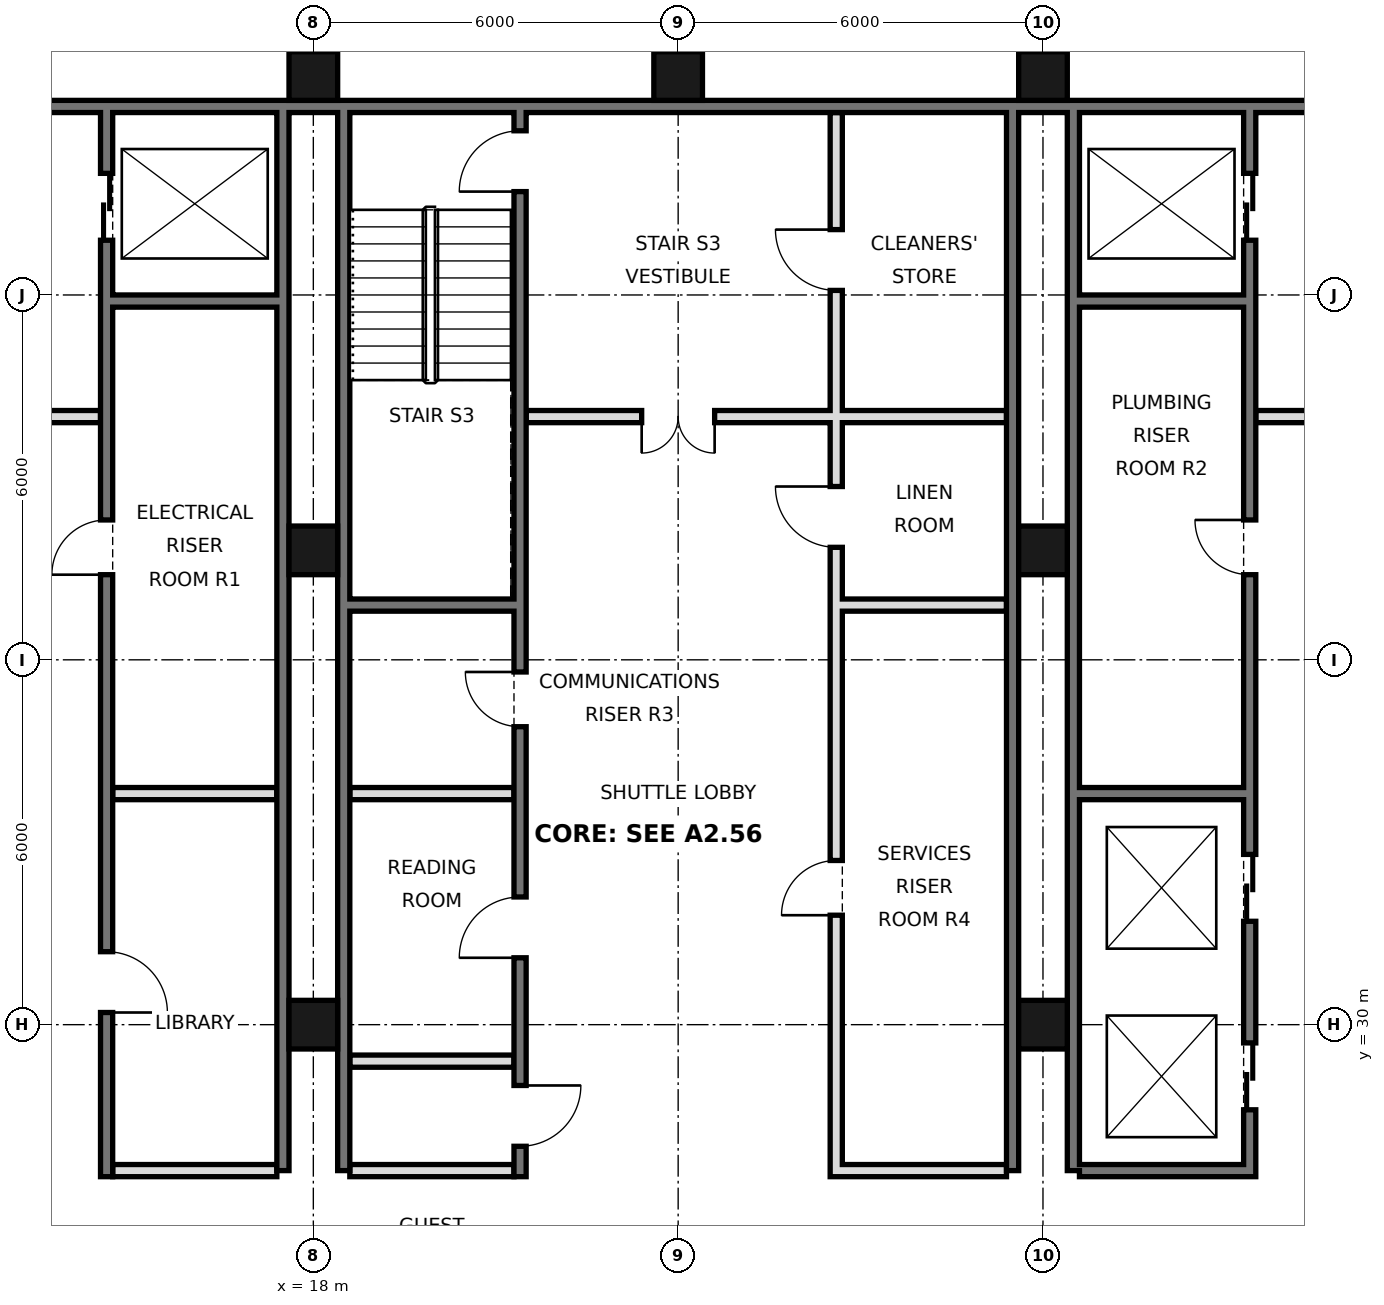
"""IFC4 building model, lengths in metres.
Left out: names, types, materials, properties, quantities, classifications, styles, units other than length and angle.
Written with IfcOpenShell. Run it as: python <this file> out.ifc"""

import sys

from ifc_helpers import new_model, si_unit, direction, frame, frame_2d, origin, origin_2d, place, context, subcontext, project, spatial, rectangle, hollow_rectangle, extrude, element, fill, save


model = new_model("IFC4")
c1 = context("Model", 3, precision=1e-05, world=origin(), true_north=direction((0.0, 1.0)))
c2 = subcontext(c1, "Body", "Model", "MODEL_VIEW")
j1 = project(units=[si_unit("LENGTHUNIT", "METRE"), si_unit("PLANEANGLEUNIT", "RADIAN")], contexts=[c1])
p1 = place(None, origin())
s1 = spatial("IfcSite", under=j1, at=p1, CompositionType="ELEMENT")
p2 = place(p1, origin())
s2 = spatial("IfcBuilding", under=s1, at=p2, CompositionType="ELEMENT")
p3 = place(p2, frame((0.0, 0.0, 222.6)))
s3 = spatial("IfcBuildingStorey", under=s2, at=p3, CompositionType="ELEMENT", Elevation=222.6)
for number, where, z_axis, x_axis in (
    (1, (18.0, 30.0, 0.0), (0.0, 0.0, 1.0), (1.0, 0.0, 0.0)),
    (2, (18.0, 37.8, 0.0), (0.0, 0.0, 1.0), (1.0, 0.0, 0.0)),
    (3, (18.0, 45.6, 0.0), (0.0, 0.0, 1.0), (1.0, 0.0, 0.0)),
    (4, (24.0, 45.6, 0.0), (0.0, 0.0, 1.0), (1.0, 0.0, 0.0)),
    (5, (30.0, 30.0, 0.0), (0.0, 0.0, 1.0), (1.0, 0.0, 0.0)),
    (6, (30.0, 37.8, 0.0), (0.0, 0.0, 1.0), (1.0, 0.0, 0.0)),
    (7, (30.0, 45.6, 0.0), (0.0, 0.0, 1.0), (1.0, 0.0, 0.0)),
):
    element("IfcColumn", number, at=place(p3, frame(where, z_axis=z_axis, x_axis=x_axis)), inside=s3, PredefinedType="COLUMN", context=c2, shape_type="SweptSolid", body=[
        extrude(hollow_rectangle(XDim=0.8, YDim=0.8, WallThickness=0.04, at=origin_2d()), origin(), (0.0, 0.0, 1.0), 3.6),
    ])
p4 = place(p3, frame((6.6, 45.1, 0.0), z_axis=(0.0, 0.0, 1.0), x_axis=(1.0, 0.0, 0.0)))
e8 = element("IfcWall", 8, at=p4, inside=s3, PredefinedType="SOLIDWALL", context=c2, shape_type="SweptSolid", body=[
    extrude(rectangle(XDim=34.8, YDim=0.2, at=frame_2d((17.4, 0.0))), origin(), (0.0, 0.0, 1.0), 3.42),
])
for number, where, z_axis, x_axis in (
    (9, (17.5, 27.6, 0.0), (0.0, 0.0, 1.0), (0.0, 1.0, 0.0)),
    (10, (18.5, 27.6, 0.0), (0.0, 0.0, 1.0), (0.0, 1.0, 0.0)),
    (11, (29.5, 27.6, 0.0), (0.0, 0.0, 1.0), (0.0, 1.0, 0.0)),
    (12, (30.5, 27.6, 0.0), (0.0, 0.0, 1.0), (0.0, 1.0, 0.0)),
):
    element("IfcWall", number, at=place(p3, frame(where, z_axis=z_axis, x_axis=x_axis)), inside=s3, PredefinedType="SOLIDWALL", context=c2, shape_type="SweptSolid", body=[
        extrude(rectangle(XDim=17.5, YDim=0.2, at=frame_2d((8.75, 0.0))), origin(), (0.0, 0.0, 1.0), 3.42),
    ])
p5 = place(p3, frame((14.6, 27.5, 0.0), z_axis=(0.0, 0.0, 1.0), x_axis=(0.0, 1.0, 0.0)))
e13 = element("IfcWall", 13, at=p5, inside=s3, PredefinedType="SOLIDWALL", context=c2, shape_type="SweptSolid", body=[
    extrude(rectangle(XDim=17.5, YDim=0.2, at=frame_2d((8.75, 0.0))), origin(), (0.0, 0.0, 1.0), 3.42),
])
p6 = place(p5, frame((15.4, 0.0, 0.0)))
e14 = element("IfcOpeningElement", 14, at=p6, cuts=e13, PredefinedType="OPENING", context=c2, shape_type="SweptSolid", body=[
    extrude(rectangle(XDim=1.1, YDim=2.1, at=frame_2d((0.55, 1.05))), frame((0.0, 0.11, 0.0), z_axis=(0.0, -1.0, 0.0), x_axis=(1.0, 0.0, 0.0)), (0.0, 0.0, 1.0), 0.22),
])
p7 = place(p5, frame((2.7, 0.0, 0.0)))
e15 = element("IfcOpeningElement", 15, at=p7, cuts=e13, PredefinedType="OPENING", context=c2, shape_type="SweptSolid", body=[
    extrude(rectangle(XDim=1.0, YDim=2.1, at=frame_2d((0.5, 1.05))), frame((0.0, 0.11, 0.0), z_axis=(0.0, -1.0, 0.0), x_axis=(1.0, 0.0, 0.0)), (0.0, 0.0, 1.0), 0.22),
])
p8 = place(p5, frame((9.9, 0.0, 0.0)))
e16 = element("IfcOpeningElement", 16, at=p8, cuts=e13, PredefinedType="OPENING", context=c2, shape_type="SweptSolid", body=[
    extrude(rectangle(XDim=0.9, YDim=2.1, at=frame_2d((0.45, 1.05))), frame((0.0, 0.11, 0.0), z_axis=(0.0, -1.0, 0.0), x_axis=(1.0, 0.0, 0.0)), (0.0, 0.0, 1.0), 0.22),
])
p9 = place(p3, frame((21.4, 27.5, 0.0), z_axis=(0.0, 0.0, 1.0), x_axis=(0.0, 1.0, 0.0)))
e17 = element("IfcWall", 17, at=p9, inside=s3, PredefinedType="SOLIDWALL", context=c2, shape_type="SweptSolid", body=[
    extrude(rectangle(XDim=17.5, YDim=0.2, at=frame_2d((8.75, 0.0))), origin(), (0.0, 0.0, 1.0), 3.42),
])
p10 = place(p9, frame((0.5, 0.0, 0.0)))
e18 = element("IfcOpeningElement", 18, at=p10, cuts=e17, PredefinedType="OPENING", context=c2, shape_type="SweptSolid", body=[
    extrude(rectangle(XDim=1.0, YDim=2.1, at=frame_2d((0.5, 1.05))), frame((0.0, 0.11, 0.0), z_axis=(0.0, -1.0, 0.0), x_axis=(1.0, 0.0, 0.0)), (0.0, 0.0, 1.0), 0.22),
])
p11 = place(p9, frame((3.6, 0.0, 0.0)))
e19 = element("IfcOpeningElement", 19, at=p11, cuts=e17, PredefinedType="OPENING", context=c2, shape_type="SweptSolid", body=[
    extrude(rectangle(XDim=1.0, YDim=2.1, at=frame_2d((0.5, 1.05))), frame((0.0, 0.11, 0.0), z_axis=(0.0, -1.0, 0.0), x_axis=(1.0, 0.0, 0.0)), (0.0, 0.0, 1.0), 0.22),
])
p12 = place(p9, frame((16.2, 0.0, 0.0)))
e20 = element("IfcOpeningElement", 20, at=p12, cuts=e17, PredefinedType="OPENING", context=c2, shape_type="SweptSolid", body=[
    extrude(rectangle(XDim=1.0, YDim=2.1, at=frame_2d((0.5, 1.05))), frame((0.0, 0.11, 0.0), z_axis=(0.0, -1.0, 0.0), x_axis=(1.0, 0.0, 0.0)), (0.0, 0.0, 1.0), 0.22),
])
p13 = place(p9, frame((7.4, 0.0, 0.0)))
e21 = element("IfcOpeningElement", 21, at=p13, cuts=e17, PredefinedType="OPENING", context=c2, shape_type="SweptSolid", body=[
    extrude(rectangle(XDim=0.9, YDim=2.1, at=frame_2d((0.45, 1.05))), frame((0.0, 0.11, 0.0), z_axis=(0.0, -1.0, 0.0), x_axis=(1.0, 0.0, 0.0)), (0.0, 0.0, 1.0), 0.22),
])
p14 = place(p3, frame((26.6, 27.5, 0.0), z_axis=(0.0, 0.0, 1.0), x_axis=(0.0, 1.0, 0.0)))
e22 = element("IfcWall", 22, at=p14, inside=s3, PredefinedType="SOLIDWALL", context=c2, shape_type="SweptSolid", body=[
    extrude(rectangle(XDim=17.5, YDim=0.2, at=frame_2d((8.75, 0.0))), origin(), (0.0, 0.0, 1.0), 3.42),
])
p15 = place(p14, frame((4.3, 0.0, 0.0)))
e23 = element("IfcOpeningElement", 23, at=p15, cuts=e22, PredefinedType="OPENING", context=c2, shape_type="SweptSolid", body=[
    extrude(rectangle(XDim=0.9, YDim=2.1, at=frame_2d((0.45, 1.05))), frame((0.0, 0.11, 0.0), z_axis=(0.0, -1.0, 0.0), x_axis=(1.0, 0.0, 0.0)), (0.0, 0.0, 1.0), 0.22),
])
p16 = place(p14, frame((10.35, 0.0, 0.0)))
e24 = element("IfcOpeningElement", 24, at=p16, cuts=e22, PredefinedType="OPENING", context=c2, shape_type="SweptSolid", body=[
    extrude(rectangle(XDim=1.0, YDim=2.1, at=frame_2d((0.5, 1.05))), frame((0.0, 0.11, 0.0), z_axis=(0.0, -1.0, 0.0), x_axis=(1.0, 0.0, 0.0)), (0.0, 0.0, 1.0), 0.22),
])
p17 = place(p14, frame((14.575, 0.0, 0.0)))
e25 = element("IfcOpeningElement", 25, at=p17, cuts=e22, PredefinedType="OPENING", context=c2, shape_type="SweptSolid", body=[
    extrude(rectangle(XDim=1.0, YDim=2.1, at=frame_2d((0.5, 1.05))), frame((0.0, 0.11, 0.0), z_axis=(0.0, -1.0, 0.0), x_axis=(1.0, 0.0, 0.0)), (0.0, 0.0, 1.0), 0.22),
])
p18 = place(p3, frame((33.4, 27.5, 0.0), z_axis=(0.0, 0.0, 1.0), x_axis=(0.0, 1.0, 0.0)))
e26 = element("IfcWall", 26, at=p18, inside=s3, PredefinedType="SOLIDWALL", context=c2, shape_type="SweptSolid", body=[
    extrude(rectangle(XDim=17.5, YDim=0.2, at=frame_2d((8.75, 0.0))), origin(), (0.0, 0.0, 1.0), 3.42),
])
p19 = place(p18, frame((1.1, 0.0, 0.0)))
e27 = element("IfcOpeningElement", 27, at=p19, cuts=e26, PredefinedType="OPENING", context=c2, shape_type="SweptSolid", body=[
    extrude(rectangle(XDim=1.1, YDim=2.1, at=frame_2d((0.55, 1.05))), frame((0.0, 0.11, 0.0), z_axis=(0.0, -1.0, 0.0), x_axis=(1.0, 0.0, 0.0)), (0.0, 0.0, 1.0), 0.22),
])
p20 = place(p18, frame((4.2, 0.0, 0.0)))
e28 = element("IfcOpeningElement", 28, at=p20, cuts=e26, PredefinedType="OPENING", context=c2, shape_type="SweptSolid", body=[
    extrude(rectangle(XDim=1.1, YDim=2.1, at=frame_2d((0.55, 1.05))), frame((0.0, 0.11, 0.0), z_axis=(0.0, -1.0, 0.0), x_axis=(1.0, 0.0, 0.0)), (0.0, 0.0, 1.0), 0.22),
])
p21 = place(p18, frame((15.4, 0.0, 0.0)))
e29 = element("IfcOpeningElement", 29, at=p21, cuts=e26, PredefinedType="OPENING", context=c2, shape_type="SweptSolid", body=[
    extrude(rectangle(XDim=1.1, YDim=2.1, at=frame_2d((0.55, 1.05))), frame((0.0, 0.11, 0.0), z_axis=(0.0, -1.0, 0.0), x_axis=(1.0, 0.0, 0.0)), (0.0, 0.0, 1.0), 0.22),
])
p22 = place(p18, frame((9.9, 0.0, 0.0)))
e30 = element("IfcOpeningElement", 30, at=p22, cuts=e26, PredefinedType="OPENING", context=c2, shape_type="SweptSolid", body=[
    extrude(rectangle(XDim=0.9, YDim=2.1, at=frame_2d((0.45, 1.05))), frame((0.0, 0.11, 0.0), z_axis=(0.0, -1.0, 0.0), x_axis=(1.0, 0.0, 0.0)), (0.0, 0.0, 1.0), 0.22),
])
for number, where, z_axis, x_axis in (
    (31, (14.7, 27.6, 0.0), (0.0, 0.0, 1.0), (1.0, 0.0, 0.0)),
    (32, (18.6, 27.6, 0.0), (0.0, 0.0, 1.0), (1.0, 0.0, 0.0)),
):
    element("IfcWall", number, at=place(p3, frame(where, z_axis=z_axis, x_axis=x_axis)), inside=s3, PredefinedType="PARTITIONING", context=c2, shape_type="SweptSolid", body=[
        extrude(rectangle(XDim=2.7, YDim=0.2, at=frame_2d((1.35, 0.0))), origin(), (0.0, 0.0, 1.0), 3.42),
    ])
for number, where, z_axis, x_axis in (
    (33, (26.7, 27.6, 0.0), (0.0, 0.0, 1.0), (1.0, 0.0, 0.0)),
    (34, (30.6, 27.6, 0.0), (0.0, 0.0, 1.0), (1.0, 0.0, 0.0)),
):
    element("IfcWall", number, at=place(p3, frame(where, z_axis=z_axis, x_axis=x_axis)), inside=s3, PredefinedType="SOLIDWALL", context=c2, shape_type="SweptSolid", body=[
        extrude(rectangle(XDim=2.7, YDim=0.2, at=frame_2d((1.35, 0.0))), origin(), (0.0, 0.0, 1.0), 3.42),
    ])
p23 = place(p3, frame((18.6, 29.4, 0.0), z_axis=(0.0, 0.0, 1.0), x_axis=(1.0, 0.0, 0.0)))
e35 = element("IfcWall", 35, at=p23, inside=s3, PredefinedType="PARTITIONING", context=c2, shape_type="SweptSolid", body=[
    extrude(rectangle(XDim=2.7, YDim=0.2, at=frame_2d((1.35, 0.0))), origin(), (0.0, 0.0, 1.0), 3.42),
])
for number, where, z_axis, x_axis in (
    (36, (14.7, 33.8, 0.0), (0.0, 0.0, 1.0), (1.0, 0.0, 0.0)),
    (37, (18.6, 33.8, 0.0), (0.0, 0.0, 1.0), (1.0, 0.0, 0.0)),
    (38, (30.6, 33.8, 0.0), (0.0, 0.0, 1.0), (1.0, 0.0, 0.0)),
    (39, (18.6, 36.9, 0.0), (0.0, 0.0, 1.0), (1.0, 0.0, 0.0)),
    (40, (26.7, 36.9, 0.0), (0.0, 0.0, 1.0), (1.0, 0.0, 0.0)),
):
    element("IfcWall", number, at=place(p3, frame(where, z_axis=z_axis, x_axis=x_axis)), inside=s3, PredefinedType="SOLIDWALL", context=c2, shape_type="SweptSolid", body=[
        extrude(rectangle(XDim=2.7, YDim=0.2, at=frame_2d((1.35, 0.0))), origin(), (0.0, 0.0, 1.0), 3.42),
    ])
p24 = place(p3, frame((21.5, 40.0, 0.0), z_axis=(0.0, 0.0, 1.0), x_axis=(1.0, 0.0, 0.0)))
e41 = element("IfcWall", 41, at=p24, inside=s3, PredefinedType="PARTITIONING", context=c2, shape_type="SweptSolid", body=[
    extrude(rectangle(XDim=7.9, YDim=0.2, at=frame_2d((3.95, 0.0))), origin(), (0.0, 0.0, 1.0), 3.42),
])
p25 = place(p24, frame((1.9, 0.0, 0.0)))
e42 = element("IfcOpeningElement", 42, at=p25, cuts=e41, PredefinedType="OPENING", context=c2, shape_type="SweptSolid", body=[
    extrude(rectangle(XDim=1.2, YDim=2.1, at=frame_2d((0.6, 1.05))), frame((0.0, 0.11, 0.0), z_axis=(0.0, -1.0, 0.0), x_axis=(1.0, 0.0, 0.0)), (0.0, 0.0, 1.0), 0.22),
])
p26 = place(p3, frame((33.5, 40.0, 0.0), z_axis=(0.0, 0.0, 1.0), x_axis=(1.0, 0.0, 0.0)))
e43 = element("IfcWall", 43, at=p26, inside=s3, PredefinedType="PARTITIONING", context=c2, shape_type="SweptSolid", body=[
    extrude(rectangle(XDim=5.0, YDim=0.2, at=frame_2d((2.5, 0.0))), origin(), (0.0, 0.0, 1.0), 3.42),
])
p27 = place(p26, frame((1.9, 0.0, 0.0)))
e44 = element("IfcOpeningElement", 44, at=p27, cuts=e43, PredefinedType="OPENING", context=c2, shape_type="SweptSolid", body=[
    extrude(rectangle(XDim=1.2, YDim=2.1, at=frame_2d((0.6, 1.05))), frame((0.0, 0.11, 0.0), z_axis=(0.0, -1.0, 0.0), x_axis=(1.0, 0.0, 0.0)), (0.0, 0.0, 1.0), 0.22),
])
p28 = place(p3, frame((9.5, 40.0, 0.0), z_axis=(0.0, 0.0, 1.0), x_axis=(1.0, 0.0, 0.0)))
e45 = element("IfcWall", 45, at=p28, inside=s3, PredefinedType="PARTITIONING", context=c2, shape_type="SweptSolid", body=[
    extrude(rectangle(XDim=5.0, YDim=0.2, at=frame_2d((2.5, 0.0))), origin(), (0.0, 0.0, 1.0), 3.42),
])
p29 = place(p28, frame((1.9, 0.0, 0.0)))
e46 = element("IfcOpeningElement", 46, at=p29, cuts=e45, PredefinedType="OPENING", context=c2, shape_type="SweptSolid", body=[
    extrude(rectangle(XDim=1.2, YDim=2.1, at=frame_2d((0.6, 1.05))), frame((0.0, 0.11, 0.0), z_axis=(0.0, -1.0, 0.0), x_axis=(1.0, 0.0, 0.0)), (0.0, 0.0, 1.0), 0.22),
])
for number, where, z_axis, x_axis in (
    (47, (14.7, 41.9, 0.0), (0.0, 0.0, 1.0), (1.0, 0.0, 0.0)),
    (48, (30.6, 41.9, 0.0), (0.0, 0.0, 1.0), (1.0, 0.0, 0.0)),
):
    element("IfcWall", number, at=place(p3, frame(where, z_axis=z_axis, x_axis=x_axis)), inside=s3, PredefinedType="SOLIDWALL", context=c2, shape_type="SweptSolid", body=[
        extrude(rectangle(XDim=2.7, YDim=0.2, at=frame_2d((1.35, 0.0))), origin(), (0.0, 0.0, 1.0), 3.42),
    ])
p30 = place(p25, frame((1.2, 0.0, 0.0), z_axis=(0.0, 0.0, 1.0), x_axis=(-1.0, 0.0, 0.0)))
e49 = element("IfcDoor", 49, at=p30, inside=s3, OperationType="DOUBLE_DOOR_SINGLE_SWING", PredefinedType="DOOR", context=c2, shape_type="SweptSolid", body=[
    extrude(rectangle(XDim=1.2, YDim=2.1, at=frame_2d((0.6, 1.05))), frame((0.0, 0.025, 0.0), z_axis=(0.0, -1.0, 0.0), x_axis=(1.0, 0.0, 0.0)), (0.0, 0.0, 1.0), 0.05),
])
fill(e42, e49)
p31 = place(p19, origin())
e50 = element("IfcDoor", 50, at=p31, inside=s3, OperationType="DOUBLE_DOOR_SLIDING", PredefinedType="DOOR", context=c2, shape_type="SweptSolid", body=[
    extrude(rectangle(XDim=1.1, YDim=2.1, at=frame_2d((0.55, 1.05))), frame((0.0, 0.025, 0.0), z_axis=(0.0, -1.0, 0.0), x_axis=(1.0, 0.0, 0.0)), (0.0, 0.0, 1.0), 0.05),
])
fill(e27, e50)
p32 = place(p20, origin())
e51 = element("IfcDoor", 51, at=p32, inside=s3, OperationType="DOUBLE_DOOR_SLIDING", PredefinedType="DOOR", context=c2, shape_type="SweptSolid", body=[
    extrude(rectangle(XDim=1.1, YDim=2.1, at=frame_2d((0.55, 1.05))), frame((0.0, 0.025, 0.0), z_axis=(0.0, -1.0, 0.0), x_axis=(1.0, 0.0, 0.0)), (0.0, 0.0, 1.0), 0.05),
])
fill(e28, e51)
p33 = place(p21, origin())
e52 = element("IfcDoor", 52, at=p33, inside=s3, OperationType="DOUBLE_DOOR_SLIDING", PredefinedType="DOOR", context=c2, shape_type="SweptSolid", body=[
    extrude(rectangle(XDim=1.1, YDim=2.1, at=frame_2d((0.55, 1.05))), frame((0.0, 0.025, 0.0), z_axis=(0.0, -1.0, 0.0), x_axis=(1.0, 0.0, 0.0)), (0.0, 0.0, 1.0), 0.05),
])
fill(e29, e52)
p34 = place(p6, origin())
e53 = element("IfcDoor", 53, at=p34, inside=s3, OperationType="DOUBLE_DOOR_SLIDING", PredefinedType="DOOR", context=c2, shape_type="SweptSolid", body=[
    extrude(rectangle(XDim=1.1, YDim=2.1, at=frame_2d((0.55, 1.05))), frame((0.0, 0.025, 0.0), z_axis=(0.0, -1.0, 0.0), x_axis=(1.0, 0.0, 0.0)), (0.0, 0.0, 1.0), 0.05),
])
fill(e14, e53)
p35 = place(p10, origin())
e54 = element("IfcDoor", 54, at=p35, inside=s3, OperationType="SINGLE_SWING_RIGHT", PredefinedType="DOOR", context=c2, shape_type="SweptSolid", body=[
    extrude(rectangle(XDim=1.0, YDim=2.1, at=frame_2d((0.5, 1.05))), frame((0.0, 0.025, 0.0), z_axis=(0.0, -1.0, 0.0), x_axis=(1.0, 0.0, 0.0)), (0.0, 0.0, 1.0), 0.05),
])
fill(e18, e54)
p36 = place(p11, origin())
e55 = element("IfcDoor", 55, at=p36, inside=s3, OperationType="SINGLE_SWING_LEFT", PredefinedType="DOOR", context=c2, shape_type="SweptSolid", body=[
    extrude(rectangle(XDim=1.0, YDim=2.1, at=frame_2d((0.5, 1.05))), frame((0.0, 0.025, 0.0), z_axis=(0.0, -1.0, 0.0), x_axis=(1.0, 0.0, 0.0)), (0.0, 0.0, 1.0), 0.05),
])
fill(e19, e55)
p37 = place(p7, frame((1.0, 0.0, 0.0), z_axis=(0.0, 0.0, 1.0), x_axis=(-1.0, 0.0, 0.0)))
e56 = element("IfcDoor", 56, at=p37, inside=s3, OperationType="SINGLE_SWING_RIGHT", PredefinedType="DOOR", context=c2, shape_type="SweptSolid", body=[
    extrude(rectangle(XDim=1.0, YDim=2.1, at=frame_2d((0.5, 1.05))), frame((0.0, 0.025, 0.0), z_axis=(0.0, -1.0, 0.0), x_axis=(1.0, 0.0, 0.0)), (0.0, 0.0, 1.0), 0.05),
])
fill(e15, e56)
p38 = place(p12, origin())
e57 = element("IfcDoor", 57, at=p38, inside=s3, OperationType="SINGLE_SWING_LEFT", PredefinedType="DOOR", context=c2, shape_type="SweptSolid", body=[
    extrude(rectangle(XDim=1.0, YDim=2.1, at=frame_2d((0.5, 1.05))), frame((0.0, 0.025, 0.0), z_axis=(0.0, -1.0, 0.0), x_axis=(1.0, 0.0, 0.0)), (0.0, 0.0, 1.0), 0.05),
])
fill(e20, e57)
p39 = place(p8, origin())
e58 = element("IfcDoor", 58, at=p39, inside=s3, OperationType="SINGLE_SWING_LEFT", PredefinedType="DOOR", context=c2, shape_type="SweptSolid", body=[
    extrude(rectangle(XDim=0.9, YDim=2.1, at=frame_2d((0.45, 1.05))), frame((0.0, 0.025, 0.0), z_axis=(0.0, -1.0, 0.0), x_axis=(1.0, 0.0, 0.0)), (0.0, 0.0, 1.0), 0.05),
])
fill(e16, e58)
p40 = place(p22, frame((0.9, 0.0, 0.0), z_axis=(0.0, 0.0, 1.0), x_axis=(-1.0, 0.0, 0.0)))
e59 = element("IfcDoor", 59, at=p40, inside=s3, OperationType="SINGLE_SWING_LEFT", PredefinedType="DOOR", context=c2, shape_type="SweptSolid", body=[
    extrude(rectangle(XDim=0.9, YDim=2.1, at=frame_2d((0.45, 1.05))), frame((0.0, 0.025, 0.0), z_axis=(0.0, -1.0, 0.0), x_axis=(1.0, 0.0, 0.0)), (0.0, 0.0, 1.0), 0.05),
])
fill(e30, e59)
p41 = place(p13, frame((0.9, 0.0, 0.0), z_axis=(0.0, 0.0, 1.0), x_axis=(-1.0, 0.0, 0.0)))
e60 = element("IfcDoor", 60, at=p41, inside=s3, OperationType="SINGLE_SWING_LEFT", PredefinedType="DOOR", context=c2, shape_type="SweptSolid", body=[
    extrude(rectangle(XDim=0.9, YDim=2.1, at=frame_2d((0.45, 1.05))), frame((0.0, 0.025, 0.0), z_axis=(0.0, -1.0, 0.0), x_axis=(1.0, 0.0, 0.0)), (0.0, 0.0, 1.0), 0.05),
])
fill(e21, e60)
p42 = place(p15, origin())
e61 = element("IfcDoor", 61, at=p42, inside=s3, OperationType="SINGLE_SWING_LEFT", PredefinedType="DOOR", context=c2, shape_type="SweptSolid", body=[
    extrude(rectangle(XDim=0.9, YDim=2.1, at=frame_2d((0.45, 1.05))), frame((0.0, 0.025, 0.0), z_axis=(0.0, -1.0, 0.0), x_axis=(1.0, 0.0, 0.0)), (0.0, 0.0, 1.0), 0.05),
])
fill(e23, e61)
p43 = place(p16, frame((1.0, 0.0, 0.0), z_axis=(0.0, 0.0, 1.0), x_axis=(-1.0, 0.0, 0.0)))
e62 = element("IfcDoor", 62, at=p43, inside=s3, OperationType="SINGLE_SWING_LEFT", PredefinedType="DOOR", context=c2, shape_type="SweptSolid", body=[
    extrude(rectangle(XDim=1.0, YDim=2.1, at=frame_2d((0.5, 1.05))), frame((0.0, 0.025, 0.0), z_axis=(0.0, -1.0, 0.0), x_axis=(1.0, 0.0, 0.0)), (0.0, 0.0, 1.0), 0.05),
])
fill(e24, e62)
p44 = place(p17, frame((1.0, 0.0, 0.0), z_axis=(0.0, 0.0, 1.0), x_axis=(-1.0, 0.0, 0.0)))
e63 = element("IfcDoor", 63, at=p44, inside=s3, OperationType="SINGLE_SWING_LEFT", PredefinedType="DOOR", context=c2, shape_type="SweptSolid", body=[
    extrude(rectangle(XDim=1.0, YDim=2.1, at=frame_2d((0.5, 1.05))), frame((0.0, 0.025, 0.0), z_axis=(0.0, -1.0, 0.0), x_axis=(1.0, 0.0, 0.0)), (0.0, 0.0, 1.0), 0.05),
])
fill(e25, e63)
save(model, sys.argv[1])
